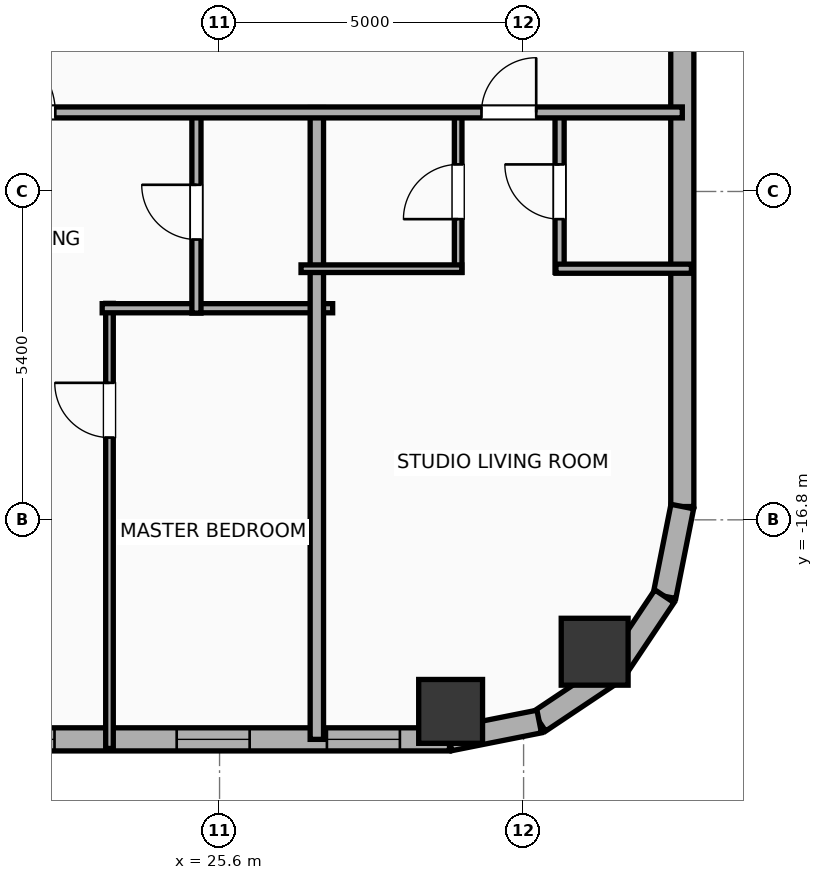
"""IFC4 building model, lengths in metres.
Left out: names, types, materials, properties, quantities, classifications, styles, units other than length and angle.
Written with IfcOpenShell. Run it as: python <this file> out.ifc"""

import sys

from ifc_helpers import new_model, si_unit, direction, frame, frame_2d, origin, origin_2d, place, context, subcontext, project, spatial, rectangle, hollow_rectangle, hollow_circle, extrude, element, fill, save


model = new_model("IFC4")
c1 = context("Model", 3, precision=1e-05, world=origin(), true_north=direction((0.0, 1.0)))
c2 = subcontext(c1, "Body", "Model", "MODEL_VIEW")
j1 = project(units=[si_unit("LENGTHUNIT", "METRE"), si_unit("PLANEANGLEUNIT", "RADIAN")], contexts=[c1])
p1 = place(None, origin())
s1 = spatial("IfcSite", under=j1, at=p1, CompositionType="ELEMENT")
p2 = place(p1, origin())
s2 = spatial("IfcBuilding", under=s1, at=p2, CompositionType="ELEMENT")
p3 = place(p2, frame((0.0, 0.0, 105.3)))
s3 = spatial("IfcBuildingStorey", under=s2, at=p3, CompositionType="ELEMENT", Elevation=105.3)
p4 = place(p3, frame((29.4, -19.95, 0.0), z_axis=(0.0, 0.0, 1.0), x_axis=(1.0, 0.0, 0.0)))
e1 = element("IfcColumn", 1, at=p4, inside=s3, PredefinedType="COLUMN", context=c2, shape_type="SweptSolid", body=[
    extrude(hollow_rectangle(XDim=1.05, YDim=1.05, WallThickness=0.036, at=origin_2d()), origin(), (0.0, 0.0, 1.0), 3.9),
])
p5 = place(p3, frame((31.769, -18.969, 0.0), z_axis=(0.0, 0.0, 1.0), x_axis=(1.0, 0.0, 0.0)))
e2 = element("IfcColumn", 2, at=p5, inside=s3, PredefinedType="COLUMN", context=c2, shape_type="SweptSolid", body=[
    extrude(hollow_circle(Radius=0.55, WallThickness=0.036, at=origin_2d()), origin(), (0.0, 0.0, 1.0), 3.9),
])
p6 = place(p3, frame((29.381, -20.41, 0.0), z_axis=(0.0, 0.0, 1.0), x_axis=(-1.0, 0.0, 0.0)))
e3 = element("IfcWall", 3, at=p6, inside=s3, PredefinedType="ELEMENTEDWALL", context=c2, shape_type="SweptSolid", body=[
    extrude(rectangle(XDim=54.763, YDim=0.38, at=frame_2d((27.381, 0.0))), origin(), (0.0, 0.0, 1.0), 3.65),
])
p7 = place(p6, frame((6.495, 0.0, 0.75)))
e4 = element("IfcOpeningElement", 4, at=p7, cuts=e3, PredefinedType="OPENING", context=c2, shape_type="SweptSolid", body=[
    extrude(rectangle(XDim=2.4, YDim=2.1, at=frame_2d((1.2, 1.05))), frame((0.0, 0.2, 0.0), z_axis=(0.0, -1.0, 0.0), x_axis=(1.0, 0.0, 0.0)), (0.0, 0.0, 1.0), 0.4),
])
p8 = place(p6, frame((17.686, 0.0, 0.75)))
e5 = element("IfcOpeningElement", 5, at=p8, cuts=e3, PredefinedType="OPENING", context=c2, shape_type="SweptSolid", body=[
    extrude(rectangle(XDim=2.4, YDim=2.1, at=frame_2d((1.2, 1.05))), frame((0.0, 0.2, 0.0), z_axis=(0.0, -1.0, 0.0), x_axis=(1.0, 0.0, 0.0)), (0.0, 0.0, 1.0), 0.4),
])
p9 = place(p6, frame((34.677, 0.0, 0.75)))
e6 = element("IfcOpeningElement", 6, at=p9, cuts=e3, PredefinedType="OPENING", context=c2, shape_type="SweptSolid", body=[
    extrude(rectangle(XDim=2.4, YDim=2.1, at=frame_2d((1.2, 1.05))), frame((0.0, 0.2, 0.0), z_axis=(0.0, -1.0, 0.0), x_axis=(1.0, 0.0, 0.0)), (0.0, 0.0, 1.0), 0.4),
])
p10 = place(p6, frame((45.867, 0.0, 0.75)))
e7 = element("IfcOpeningElement", 7, at=p10, cuts=e3, PredefinedType="OPENING", context=c2, shape_type="SweptSolid", body=[
    extrude(rectangle(XDim=2.4, YDim=2.1, at=frame_2d((1.2, 1.05))), frame((0.0, 0.2, 0.0), z_axis=(0.0, -1.0, 0.0), x_axis=(1.0, 0.0, 0.0)), (0.0, 0.0, 1.0), 0.4),
])
p11 = place(p6, frame((52.281, 0.0, 0.75)))
e8 = element("IfcOpeningElement", 8, at=p11, cuts=e3, PredefinedType="OPENING", context=c2, shape_type="SweptSolid", body=[
    extrude(rectangle(XDim=1.2, YDim=2.05, at=frame_2d((0.6, 1.025))), frame((0.0, 0.2, 0.0), z_axis=(0.0, -1.0, 0.0), x_axis=(1.0, 0.0, 0.0)), (0.0, 0.0, 1.0), 0.4),
])
p12 = place(p6, frame((49.641, 0.0, 0.75)))
e9 = element("IfcOpeningElement", 9, at=p12, cuts=e3, PredefinedType="OPENING", context=c2, shape_type="SweptSolid", body=[
    extrude(rectangle(XDim=1.2, YDim=2.05, at=frame_2d((0.6, 1.025))), frame((0.0, 0.2, 0.0), z_axis=(0.0, -1.0, 0.0), x_axis=(1.0, 0.0, 0.0)), (0.0, 0.0, 1.0), 0.4),
])
p13 = place(p6, frame((39.543, 0.0, 0.75)))
e10 = element("IfcOpeningElement", 10, at=p13, cuts=e3, PredefinedType="OPENING", context=c2, shape_type="SweptSolid", body=[
    extrude(rectangle(XDim=1.2, YDim=2.05, at=frame_2d((0.6, 1.025))), frame((0.0, 0.2, 0.0), z_axis=(0.0, -1.0, 0.0), x_axis=(1.0, 0.0, 0.0)), (0.0, 0.0, 1.0), 0.4),
])
p14 = place(p6, frame((44.538, 0.0, 0.75)))
e11 = element("IfcOpeningElement", 11, at=p14, cuts=e3, PredefinedType="OPENING", context=c2, shape_type="SweptSolid", body=[
    extrude(rectangle(XDim=0.52, YDim=2.05, at=frame_2d((0.26, 1.025))), frame((0.0, 0.2, 0.0), z_axis=(0.0, -1.0, 0.0), x_axis=(1.0, 0.0, 0.0)), (0.0, 0.0, 1.0), 0.4),
])
p15 = place(p6, frame((28.206, 0.0, 0.75)))
e12 = element("IfcOpeningElement", 12, at=p15, cuts=e3, PredefinedType="OPENING", context=c2, shape_type="SweptSolid", body=[
    extrude(rectangle(XDim=1.2, YDim=2.05, at=frame_2d((0.6, 1.025))), frame((0.0, 0.2, 0.0), z_axis=(0.0, -1.0, 0.0), x_axis=(1.0, 0.0, 0.0)), (0.0, 0.0, 1.0), 0.4),
])
p16 = place(p6, frame((31.241, 0.0, 0.75)))
e13 = element("IfcOpeningElement", 13, at=p16, cuts=e3, PredefinedType="OPENING", context=c2, shape_type="SweptSolid", body=[
    extrude(rectangle(XDim=0.85, YDim=2.05, at=frame_2d((0.425, 1.025))), frame((0.0, 0.2, 0.0), z_axis=(0.0, -1.0, 0.0), x_axis=(1.0, 0.0, 0.0)), (0.0, 0.0, 1.0), 0.4),
])
p17 = place(p6, frame((24.561, 0.0, 0.75)))
e14 = element("IfcOpeningElement", 14, at=p17, cuts=e3, PredefinedType="OPENING", context=c2, shape_type="SweptSolid", body=[
    extrude(rectangle(XDim=1.2, YDim=2.05, at=frame_2d((0.6, 1.025))), frame((0.0, 0.2, 0.0), z_axis=(0.0, -1.0, 0.0), x_axis=(1.0, 0.0, 0.0)), (0.0, 0.0, 1.0), 0.4),
])
p18 = place(p6, frame((22.561, 0.0, 0.75)))
e15 = element("IfcOpeningElement", 15, at=p18, cuts=e3, PredefinedType="OPENING", context=c2, shape_type="SweptSolid", body=[
    extrude(rectangle(XDim=0.52, YDim=2.05, at=frame_2d((0.26, 1.025))), frame((0.0, 0.2, 0.0), z_axis=(0.0, -1.0, 0.0), x_axis=(1.0, 0.0, 0.0)), (0.0, 0.0, 1.0), 0.4),
])
p19 = place(p6, frame((13.886, 0.0, 0.75)))
e16 = element("IfcOpeningElement", 16, at=p19, cuts=e3, PredefinedType="OPENING", context=c2, shape_type="SweptSolid", body=[
    extrude(rectangle(XDim=1.2, YDim=2.05, at=frame_2d((0.6, 1.025))), frame((0.0, 0.2, 0.0), z_axis=(0.0, -1.0, 0.0), x_axis=(1.0, 0.0, 0.0)), (0.0, 0.0, 1.0), 0.4),
])
p20 = place(p6, frame((11.694, 0.0, 0.75)))
e17 = element("IfcOpeningElement", 17, at=p20, cuts=e3, PredefinedType="OPENING", context=c2, shape_type="SweptSolid", body=[
    extrude(rectangle(XDim=0.85, YDim=2.05, at=frame_2d((0.425, 1.025))), frame((0.0, 0.2, 0.0), z_axis=(0.0, -1.0, 0.0), x_axis=(1.0, 0.0, 0.0)), (0.0, 0.0, 1.0), 0.4),
])
p21 = place(p6, frame((3.286, 0.0, 0.75)))
e18 = element("IfcOpeningElement", 18, at=p21, cuts=e3, PredefinedType="OPENING", context=c2, shape_type="SweptSolid", body=[
    extrude(rectangle(XDim=1.2, YDim=2.05, at=frame_2d((0.6, 1.025))), frame((0.0, 0.2, 0.0), z_axis=(0.0, -1.0, 0.0), x_axis=(1.0, 0.0, 0.0)), (0.0, 0.0, 1.0), 0.4),
])
p22 = place(p6, frame((0.816, 0.0, 0.75)))
e19 = element("IfcOpeningElement", 19, at=p22, cuts=e3, PredefinedType="OPENING", context=c2, shape_type="SweptSolid", body=[
    extrude(rectangle(XDim=1.2, YDim=2.05, at=frame_2d((0.6, 1.025))), frame((0.0, 0.2, 0.0), z_axis=(0.0, -1.0, 0.0), x_axis=(1.0, 0.0, 0.0)), (0.0, 0.0, 1.0), 0.4),
])
p23 = place(p3, frame((33.21, 17.781, 0.0), z_axis=(0.0, 0.0, 1.0), x_axis=(0.0, -1.0, 0.0)))
e20 = element("IfcWall", 20, at=p23, inside=s3, PredefinedType="ELEMENTEDWALL", context=c2, shape_type="SweptSolid", body=[
    extrude(rectangle(XDim=34.363, YDim=0.38, at=frame_2d((17.181, 0.0))), origin(), (0.0, 0.0, 1.0), 3.65),
])
p24 = place(p23, frame((12.836, 0.0, 0.75)))
e21 = element("IfcOpeningElement", 21, at=p24, cuts=e20, PredefinedType="OPENING", context=c2, shape_type="SweptSolid", body=[
    extrude(rectangle(XDim=1.2, YDim=2.05, at=frame_2d((0.6, 1.025))), frame((0.0, 0.2, 0.0), z_axis=(0.0, -1.0, 0.0), x_axis=(1.0, 0.0, 0.0)), (0.0, 0.0, 1.0), 0.4),
])
p25 = place(p23, frame((21.386, 0.0, 0.75)))
e22 = element("IfcOpeningElement", 22, at=p25, cuts=e20, PredefinedType="OPENING", context=c2, shape_type="SweptSolid", body=[
    extrude(rectangle(XDim=1.2, YDim=2.05, at=frame_2d((0.6, 1.025))), frame((0.0, 0.2, 0.0), z_axis=(0.0, -1.0, 0.0), x_axis=(1.0, 0.0, 0.0)), (0.0, 0.0, 1.0), 0.4),
])
p26 = place(p3, frame((33.21, -16.581, 0.0), z_axis=(0.0, 0.0, 1.0), x_axis=(-0.195086038585, -0.980786132421, 0.0)))
e23 = element("IfcWall", 23, at=p26, inside=s3, PredefinedType="ELEMENTEDWALL", context=c2, shape_type="SweptSolid", body=[
    extrude(rectangle(XDim=1.504, YDim=0.38, at=frame_2d((0.752, 0.0))), origin(), (0.0, 0.0, 1.0), 3.65),
])
p27 = place(p3, frame((32.917, -18.057, 0.0), z_axis=(0.0, 0.0, 1.0), x_axis=(-0.555610286119, -0.831442848281, 0.0)))
e24 = element("IfcWall", 24, at=p27, inside=s3, PredefinedType="ELEMENTEDWALL", context=c2, shape_type="SweptSolid", body=[
    extrude(rectangle(XDim=1.485, YDim=0.38, at=frame_2d((0.743, 0.0))), origin(), (0.0, 0.0, 1.0), 3.65),
])
p28 = place(p3, frame((32.091, -19.292, 0.0), z_axis=(0.0, 0.0, 1.0), x_axis=(-0.831468045563, -0.555572577804, 0.0)))
e25 = element("IfcWall", 25, at=p28, inside=s3, PredefinedType="ELEMENTEDWALL", context=c2, shape_type="SweptSolid", body=[
    extrude(rectangle(XDim=1.485, YDim=0.38, at=frame_2d((0.742, 0.0))), origin(), (0.0, 0.0, 1.0), 3.65),
])
p29 = place(p3, frame((30.857, -20.116, 0.0), z_axis=(0.0, 0.0, 1.0), x_axis=(-0.980786132421, -0.195086038585, 0.0)))
e26 = element("IfcWall", 26, at=p29, inside=s3, PredefinedType="ELEMENTEDWALL", context=c2, shape_type="SweptSolid", body=[
    extrude(rectangle(XDim=1.504, YDim=0.38, at=frame_2d((0.752, 0.0))), origin(), (0.0, 0.0, 1.0), 3.65),
])
p30 = place(p3, frame((23.79, -20.56, 0.0), z_axis=(0.0, 0.0, 1.0), x_axis=(0.0, 1.0, 0.0)))
e27 = element("IfcWall", 27, at=p30, inside=s3, PredefinedType="PARTITIONING", context=c2, shape_type="SweptSolid", body=[
    extrude(rectangle(XDim=7.32, YDim=0.125, at=frame_2d((3.66, 0.0))), origin(), (0.0, 0.0, 1.0), 3.65),
])
p31 = place(p30, frame((5.113, 0.0, 0.0)))
e28 = element("IfcOpeningElement", 28, at=p31, cuts=e27, PredefinedType="OPENING", context=c2, shape_type="SweptSolid", body=[
    extrude(rectangle(XDim=0.9, YDim=2.05, at=frame_2d((0.45, 1.025))), frame((0.0, 0.073, 0.0), z_axis=(0.0, -1.0, 0.0), x_axis=(1.0, 0.0, 0.0)), (0.0, 0.0, 1.0), 0.145),
])
p32 = place(p3, frame((23.67, -13.32, 0.0), z_axis=(0.0, 0.0, 1.0), x_axis=(1.0, 0.0, 0.0)))
e29 = element("IfcWall", 29, at=p32, inside=s3, PredefinedType="PLUMBINGWALL", context=c2, shape_type="SweptSolid", body=[
    extrude(rectangle(XDim=3.79, YDim=0.15, at=frame_2d((1.895, 0.0))), origin(), (0.0, 0.0, 1.0), 3.65),
])
p33 = place(p3, frame((25.22, -13.4, 0.0), z_axis=(0.0, 0.0, 1.0), x_axis=(0.0, 1.0, 0.0)))
e30 = element("IfcWall", 30, at=p33, inside=s3, PredefinedType="PLUMBINGWALL", context=c2, shape_type="SweptSolid", body=[
    extrude(rectangle(XDim=3.32, YDim=0.15, at=frame_2d((1.66, 0.0))), origin(), (0.0, 0.0, 1.0), 3.65),
])
p34 = place(p33, frame((1.21, 0.0, 0.0)))
e31 = element("IfcOpeningElement", 31, at=p34, cuts=e30, PredefinedType="OPENING", context=c2, shape_type="SweptSolid", body=[
    extrude(rectangle(XDim=0.9, YDim=2.05, at=frame_2d((0.45, 1.025))), frame((0.0, 0.085, 0.0), z_axis=(0.0, -1.0, 0.0), x_axis=(1.0, 0.0, 0.0)), (0.0, 0.0, 1.0), 0.17),
])
p35 = place(p3, frame((27.2, -20.41, 0.0), z_axis=(0.0, 0.0, 1.0), x_axis=(0.0, 1.0, 0.0)))
e32 = element("IfcWall", 32, at=p35, inside=s3, PredefinedType="PARTITIONING", context=c2, shape_type="SweptSolid", body=[
    extrude(rectangle(XDim=10.39, YDim=0.22, at=frame_2d((5.195, 0.0))), origin(), (0.0, 0.0, 1.0), 3.65),
])
p36 = place(p3, frame((29.524, -12.73, 0.0), z_axis=(0.0, 0.0, 1.0), x_axis=(0.0, 1.0, 0.0)))
e33 = element("IfcWall", 33, at=p36, inside=s3, PredefinedType="PARTITIONING", context=c2, shape_type="SweptSolid", body=[
    extrude(rectangle(XDim=2.65, YDim=0.125, at=frame_2d((1.325, 0.0))), origin(), (0.0, 0.0, 1.0), 3.65),
])
p37 = place(p36, frame((0.875, 0.0, 0.0)))
e34 = element("IfcOpeningElement", 34, at=p37, cuts=e33, PredefinedType="OPENING", context=c2, shape_type="SweptSolid", body=[
    extrude(rectangle(XDim=0.9, YDim=2.05, at=frame_2d((0.45, 1.025))), frame((0.0, 0.073, 0.0), z_axis=(0.0, -1.0, 0.0), x_axis=(1.0, 0.0, 0.0)), (0.0, 0.0, 1.0), 0.145),
])
p38 = place(p3, frame((31.192, -12.73, 0.0), z_axis=(0.0, 0.0, 1.0), x_axis=(0.0, 1.0, 0.0)))
e35 = element("IfcWall", 35, at=p38, inside=s3, PredefinedType="PLUMBINGWALL", context=c2, shape_type="SweptSolid", body=[
    extrude(rectangle(XDim=2.65, YDim=0.15, at=frame_2d((1.325, 0.0))), origin(), (0.0, 0.0, 1.0), 3.65),
])
p39 = place(p38, frame((0.875, 0.0, 0.0)))
e36 = element("IfcOpeningElement", 36, at=p39, cuts=e35, PredefinedType="OPENING", context=c2, shape_type="SweptSolid", body=[
    extrude(rectangle(XDim=0.9, YDim=2.05, at=frame_2d((0.45, 1.025))), frame((0.0, 0.085, 0.0), z_axis=(0.0, -1.0, 0.0), x_axis=(1.0, 0.0, 0.0)), (0.0, 0.0, 1.0), 0.17),
])
p40 = place(p3, frame((26.94, -12.67, 0.0), z_axis=(0.0, 0.0, 1.0), x_axis=(1.0, 0.0, 0.0)))
e37 = element("IfcWall", 37, at=p40, inside=s3, PredefinedType="PARTITIONING", context=c2, shape_type="SweptSolid", body=[
    extrude(rectangle(XDim=2.644, YDim=0.125, at=frame_2d((1.322, 0.0))), origin(), (0.0, 0.0, 1.0), 3.65),
])
p41 = place(p3, frame((31.132, -12.67, 0.0), z_axis=(0.0, 0.0, 1.0), x_axis=(1.0, 0.0, 0.0)))
e38 = element("IfcWall", 38, at=p41, inside=s3, PredefinedType="PLUMBINGWALL", context=c2, shape_type="SweptSolid", body=[
    extrude(rectangle(XDim=2.228, YDim=0.15, at=frame_2d((1.114, 0.0))), origin(), (0.0, 0.0, 1.0), 3.65),
])
p42 = place(p3, frame((-29.21, -10.1, 0.0), z_axis=(0.0, 0.0, 1.0), x_axis=(1.0, 0.0, 0.0)))
e39 = element("IfcWall", 39, at=p42, inside=s3, PredefinedType="PARTITIONING", context=c2, shape_type="SweptSolid", body=[
    extrude(rectangle(XDim=62.42, YDim=0.18, at=frame_2d((31.21, 0.0))), origin(), (0.0, 0.0, 1.0), 3.65),
])
p43 = place(p42, frame((3.033, 0.0, 0.0)))
e40 = element("IfcOpeningElement", 40, at=p43, cuts=e39, PredefinedType="OPENING", context=c2, shape_type="SweptSolid", body=[
    extrude(rectangle(XDim=0.9, YDim=2.05, at=frame_2d((0.45, 1.025))), frame((0.0, 0.1, 0.0), z_axis=(0.0, -1.0, 0.0), x_axis=(1.0, 0.0, 0.0)), (0.0, 0.0, 1.0), 0.2),
])
p44 = place(p42, frame((9.768, 0.0, 0.0)))
e41 = element("IfcOpeningElement", 41, at=p44, cuts=e39, PredefinedType="OPENING", context=c2, shape_type="SweptSolid", body=[
    extrude(rectangle(XDim=0.9, YDim=2.05, at=frame_2d((0.45, 1.025))), frame((0.0, 0.1, 0.0), z_axis=(0.0, -1.0, 0.0), x_axis=(1.0, 0.0, 0.0)), (0.0, 0.0, 1.0), 0.2),
])
p45 = place(p42, frame((18.65, 0.0, 0.0)))
e42 = element("IfcOpeningElement", 42, at=p45, cuts=e39, PredefinedType="OPENING", context=c2, shape_type="SweptSolid", body=[
    extrude(rectangle(XDim=1.15, YDim=2.05, at=frame_2d((0.575, 1.025))), frame((0.0, 0.1, 0.0), z_axis=(0.0, -1.0, 0.0), x_axis=(1.0, 0.0, 0.0)), (0.0, 0.0, 1.0), 0.2),
])
p46 = place(p42, frame((29.212, 0.0, 0.0)))
e43 = element("IfcOpeningElement", 43, at=p46, cuts=e39, PredefinedType="OPENING", context=c2, shape_type="SweptSolid", body=[
    extrude(rectangle(XDim=1.15, YDim=2.05, at=frame_2d((0.575, 1.025))), frame((0.0, 0.1, 0.0), z_axis=(0.0, -1.0, 0.0), x_axis=(1.0, 0.0, 0.0)), (0.0, 0.0, 1.0), 0.2),
])
p47 = place(p42, frame((40.379, 0.0, 0.0)))
e44 = element("IfcOpeningElement", 44, at=p47, cuts=e39, PredefinedType="OPENING", context=c2, shape_type="SweptSolid", body=[
    extrude(rectangle(XDim=1.15, YDim=2.05, at=frame_2d((0.575, 1.025))), frame((0.0, 0.1, 0.0), z_axis=(0.0, -1.0, 0.0), x_axis=(1.0, 0.0, 0.0)), (0.0, 0.0, 1.0), 0.2),
])
p48 = place(p42, frame((50.959, 0.0, 0.0)))
e45 = element("IfcOpeningElement", 45, at=p48, cuts=e39, PredefinedType="OPENING", context=c2, shape_type="SweptSolid", body=[
    extrude(rectangle(XDim=1.15, YDim=2.05, at=frame_2d((0.575, 1.025))), frame((0.0, 0.1, 0.0), z_axis=(0.0, -1.0, 0.0), x_axis=(1.0, 0.0, 0.0)), (0.0, 0.0, 1.0), 0.2),
])
p49 = place(p42, frame((59.117, 0.0, 0.0)))
e46 = element("IfcOpeningElement", 46, at=p49, cuts=e39, PredefinedType="OPENING", context=c2, shape_type="SweptSolid", body=[
    extrude(rectangle(XDim=0.9, YDim=2.05, at=frame_2d((0.45, 1.025))), frame((0.0, 0.1, 0.0), z_axis=(0.0, -1.0, 0.0), x_axis=(1.0, 0.0, 0.0)), (0.0, 0.0, 1.0), 0.2),
])
p50 = place(p7, origin())
e47 = element("IfcWindow", 47, at=p50, inside=s3, PartitioningType="SINGLE_PANEL", PredefinedType="WINDOW", context=c2, shape_type="SweptSolid", body=[
    extrude(rectangle(XDim=2.4, YDim=2.1, at=frame_2d((1.2, 1.05))), frame((0.0, 0.03, 0.0), z_axis=(0.0, -1.0, 0.0), x_axis=(1.0, 0.0, 0.0)), (0.0, 0.0, 1.0), 0.06),
])
fill(e4, e47)
p51 = place(p21, origin())
e48 = element("IfcWindow", 48, at=p51, inside=s3, PartitioningType="SINGLE_PANEL", PredefinedType="WINDOW", context=c2, shape_type="SweptSolid", body=[
    extrude(rectangle(XDim=1.2, YDim=2.05, at=frame_2d((0.6, 1.025))), frame((0.0, 0.03, 0.0), z_axis=(0.0, -1.0, 0.0), x_axis=(1.0, 0.0, 0.0)), (0.0, 0.0, 1.0), 0.06),
])
fill(e18, e48)
p52 = place(p22, origin())
e49 = element("IfcWindow", 49, at=p52, inside=s3, PartitioningType="SINGLE_PANEL", PredefinedType="WINDOW", context=c2, shape_type="SweptSolid", body=[
    extrude(rectangle(XDim=1.2, YDim=2.05, at=frame_2d((0.6, 1.025))), frame((0.0, 0.03, 0.0), z_axis=(0.0, -1.0, 0.0), x_axis=(1.0, 0.0, 0.0)), (0.0, 0.0, 1.0), 0.06),
])
fill(e19, e49)
p53 = place(p31, origin())
e50 = element("IfcDoor", 50, at=p53, inside=s3, OperationType="SINGLE_SWING_RIGHT", PredefinedType="DOOR", context=c2, shape_type="SweptSolid", body=[
    extrude(rectangle(XDim=0.9, YDim=2.05, at=frame_2d((0.45, 1.025))), frame((0.0, 0.025, 0.0), z_axis=(0.0, -1.0, 0.0), x_axis=(1.0, 0.0, 0.0)), (0.0, 0.0, 1.0), 0.05),
])
fill(e28, e50)
p54 = place(p34, origin())
e51 = element("IfcDoor", 51, at=p54, inside=s3, OperationType="SINGLE_SWING_RIGHT", PredefinedType="DOOR", context=c2, shape_type="SweptSolid", body=[
    extrude(rectangle(XDim=0.9, YDim=2.05, at=frame_2d((0.45, 1.025))), frame((0.0, 0.025, 0.0), z_axis=(0.0, -1.0, 0.0), x_axis=(1.0, 0.0, 0.0)), (0.0, 0.0, 1.0), 0.05),
])
fill(e31, e51)
p55 = place(p37, origin())
e52 = element("IfcDoor", 52, at=p55, inside=s3, OperationType="SINGLE_SWING_LEFT", PredefinedType="DOOR", context=c2, shape_type="SweptSolid", body=[
    extrude(rectangle(XDim=0.9, YDim=2.05, at=frame_2d((0.45, 1.025))), frame((0.0, 0.025, 0.0), z_axis=(0.0, -1.0, 0.0), x_axis=(1.0, 0.0, 0.0)), (0.0, 0.0, 1.0), 0.05),
])
fill(e34, e52)
p56 = place(p39, origin())
e53 = element("IfcDoor", 53, at=p56, inside=s3, OperationType="SINGLE_SWING_RIGHT", PredefinedType="DOOR", context=c2, shape_type="SweptSolid", body=[
    extrude(rectangle(XDim=0.9, YDim=2.05, at=frame_2d((0.45, 1.025))), frame((0.0, 0.025, 0.0), z_axis=(0.0, -1.0, 0.0), x_axis=(1.0, 0.0, 0.0)), (0.0, 0.0, 1.0), 0.05),
])
fill(e36, e53)
p57 = place(p48, origin())
e54 = element("IfcDoor", 54, at=p57, inside=s3, OperationType="SINGLE_SWING_LEFT", PredefinedType="DOOR", context=c2, shape_type="SweptSolid", body=[
    extrude(rectangle(XDim=1.15, YDim=2.05, at=frame_2d((0.575, 1.025))), frame((0.0, 0.025, 0.0), z_axis=(0.0, -1.0, 0.0), x_axis=(1.0, 0.0, 0.0)), (0.0, 0.0, 1.0), 0.05),
])
fill(e45, e54)
p58 = place(p49, origin())
e55 = element("IfcDoor", 55, at=p58, inside=s3, OperationType="SINGLE_SWING_RIGHT", PredefinedType="DOOR", context=c2, shape_type="SweptSolid", body=[
    extrude(rectangle(XDim=0.9, YDim=2.05, at=frame_2d((0.45, 1.025))), frame((0.0, 0.025, 0.0), z_axis=(0.0, -1.0, 0.0), x_axis=(1.0, 0.0, 0.0)), (0.0, 0.0, 1.0), 0.05),
])
fill(e46, e55)
save(model, sys.argv[1])
